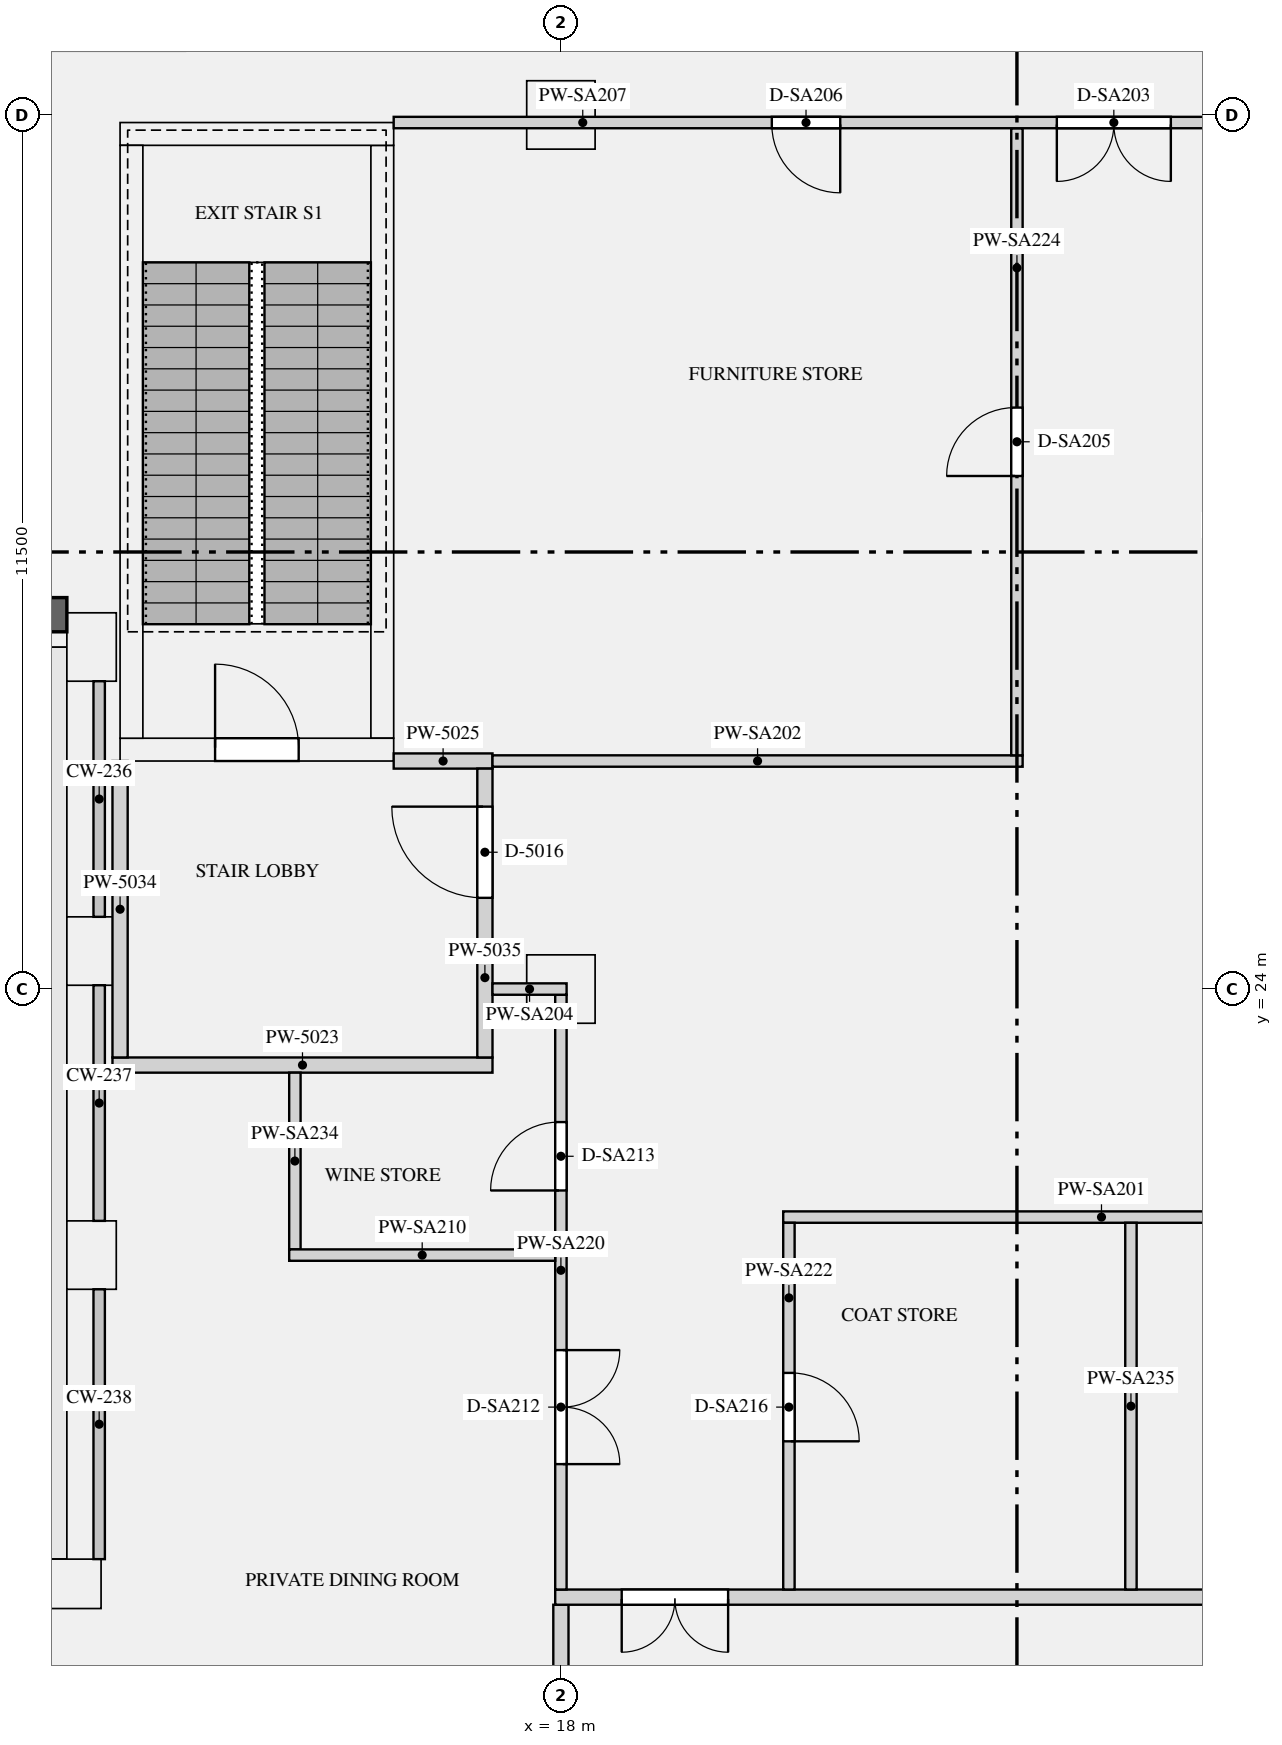
"""IFC4 building model, lengths in metres.
Left out: names, types, materials, properties, quantities, classifications, styles, units other than length and angle.
Written with IfcOpenShell. Run it as: python <this file> out.ifc"""

import sys

from ifc_helpers import new_model, si_unit, direction, frame, frame_2d, origin, origin_2d, place, context, subcontext, project, spatial, rectangle, extrude, element, fill, save


model = new_model("IFC4")
c1 = context("Model", 3, precision=1e-05, world=origin(), true_north=direction((0.0, 1.0)))
c2 = subcontext(c1, "Body", "Model", "MODEL_VIEW")
j1 = project(units=[si_unit("LENGTHUNIT", "METRE"), si_unit("PLANEANGLEUNIT", "RADIAN")], contexts=[c1])
p1 = place(None, origin())
s1 = spatial("IfcSite", under=j1, at=p1, CompositionType="ELEMENT")
p2 = place(p1, origin())
s2 = spatial("IfcBuilding", under=s1, at=p2, CompositionType="ELEMENT")
p3 = place(p2, frame((0.0, 0.0, 191.7)))
s3 = spatial("IfcBuildingStorey", under=s2, at=p3, CompositionType="ELEMENT", Elevation=191.7)
for number, where, z_axis, x_axis in (
    (1, (11.825, 28.5, 0.0), (0.0, 0.0, 1.0), (0.0, -1.0, 0.0)),
    (2, (11.825, 24.5, 0.0), (0.0, 0.0, 1.0), (0.0, -1.0, 0.0)),
    (3, (11.825, 20.5, 0.0), (0.0, 0.0, 1.0), (0.0, -1.0, 0.0)),
    (4, (11.5, 16.175, 0.0), (0.0, 0.0, 1.0), (-1.0, 0.0, 0.0)),
):
    element("IfcColumn", number, at=place(p3, frame(where, z_axis=z_axis, x_axis=x_axis)), inside=s3, PredefinedType="USERDEFINED", context=c2, shape_type="SweptSolid", body=[
        extrude(rectangle(XDim=0.9, YDim=0.65, at=origin_2d()), origin(), (0.0, 0.0, 1.0), 6.3),
    ])
for number, where, z_axis, x_axis in (
    (5, (18.0, 24.0, 0.0), (0.0, 0.0, 1.0), (1.0, 0.0, 0.0)),
    (6, (18.0, 35.5, 0.0), (0.0, 0.0, 1.0), (1.0, 0.0, 0.0)),
):
    element("IfcColumn", number, at=place(p3, frame(where, z_axis=z_axis, x_axis=x_axis)), inside=s3, PredefinedType="COLUMN", context=c2, shape_type="SweptSolid", body=[
        extrude(rectangle(XDim=0.9, YDim=0.9, at=origin_2d()), origin(), (0.0, 0.0, 1.0), 6.3),
    ])
p4 = place(p3, frame((12.2, 27.15, 0.0), z_axis=(0.0, 0.0, 1.0), x_axis=(1.0, 0.0, 0.0)))
e7 = element("IfcWall", 7, at=p4, inside=s3, PredefinedType="SHEAR", context=c2, shape_type="SweptSolid", body=[
    extrude(rectangle(XDim=3.6, YDim=0.3, at=frame_2d((1.8, 0.0))), origin(), (0.0, 0.0, 1.0), 6.3),
])
p5 = place(p4, frame((1.25, 0.0, 0.0)))
e8 = element("IfcOpeningElement", 8, at=p5, cuts=e7, PredefinedType="OPENING", context=c2, shape_type="SweptSolid", body=[
    extrude(rectangle(XDim=1.1, YDim=2.1, at=frame_2d((0.55, 1.05))), frame((0.0, 0.16, 0.0), z_axis=(0.0, -1.0, 0.0), x_axis=(1.0, 0.0, 0.0)), (0.0, 0.0, 1.0), 0.32),
])
p6 = place(p3, frame((12.2, 35.25, 0.0), z_axis=(0.0, 0.0, 1.0), x_axis=(1.0, 0.0, 0.0)))
e9 = element("IfcWall", 9, at=p6, inside=s3, PredefinedType="SHEAR", context=c2, shape_type="SweptSolid", body=[
    extrude(rectangle(XDim=3.6, YDim=0.3, at=frame_2d((1.8, 0.0))), origin(), (0.0, 0.0, 1.0), 6.3),
])
for number, where, z_axis, x_axis in (
    (10, (12.35, 27.3, 0.0), (0.0, 0.0, 1.0), (0.0, 1.0, 0.0)),
    (11, (15.65, 27.3, 0.0), (0.0, 0.0, 1.0), (0.0, 1.0, 0.0)),
):
    element("IfcWall", number, at=place(p3, frame(where, z_axis=z_axis, x_axis=x_axis)), inside=s3, PredefinedType="SHEAR", context=c2, shape_type="SweptSolid", body=[
        extrude(rectangle(XDim=7.8, YDim=0.3, at=frame_2d((3.9, 0.0))), origin(), (0.0, 0.0, 1.0), 6.3),
    ])
p7 = place(p3, frame((9.9, 28.925, 0.9), z_axis=(0.0, 0.0, 1.0), x_axis=(1.0, 0.0, 0.0)))
e12 = element("IfcWall", 12, at=p7, inside=s3, PredefinedType="SOLIDWALL", context=c2, shape_type="SweptSolid", body=[
    extrude(rectangle(XDim=1.6, YDim=0.45, at=frame_2d((0.8, 0.0))), origin(), (0.0, 0.0, 1.0), 5.08),
])
p8 = place(p3, frame((12.1, 23.0, 0.0), z_axis=(0.0, 0.0, 1.0), x_axis=(1.0, 0.0, 0.0)))
e13 = element("IfcWall", 13, at=p8, inside=s3, PredefinedType="PARTITIONING", context=c2, shape_type="SweptSolid", body=[
    extrude(rectangle(XDim=5.0, YDim=0.2, at=frame_2d((2.5, 0.0))), origin(), (0.0, 0.0, 1.0), 5.98),
])
p9 = place(p3, frame((15.8, 27.0, 0.0), z_axis=(0.0, 0.0, 1.0), x_axis=(1.0, 0.0, 0.0)))
e14 = element("IfcWall", 14, at=p9, inside=s3, PredefinedType="PARTITIONING", context=c2, shape_type="SweptSolid", body=[
    extrude(rectangle(XDim=1.3, YDim=0.2, at=frame_2d((0.65, 0.0))), origin(), (0.0, 0.0, 1.0), 5.98),
])
p10 = place(p3, frame((18.0, 12.5, 0.0), z_axis=(0.0, 0.0, 1.0), x_axis=(0.0, 1.0, 0.0)))
e15 = element("IfcWall", 15, at=p10, inside=s3, PredefinedType="PARTITIONING", context=c2, shape_type="SweptSolid", body=[
    extrude(rectangle(XDim=3.4, YDim=0.2, at=frame_2d((1.7, 0.0))), origin(), (0.0, 0.0, 1.0), 5.98),
])
p11 = place(p3, frame((12.2, 23.1, 0.0), z_axis=(0.0, 0.0, 1.0), x_axis=(0.0, 1.0, 0.0)))
e16 = element("IfcWall", 16, at=p11, inside=s3, PredefinedType="PARTITIONING", context=c2, shape_type="SweptSolid", body=[
    extrude(rectangle(XDim=3.9, YDim=0.2, at=frame_2d((1.95, 0.0))), origin(), (0.0, 0.0, 1.0), 5.98),
])
p12 = place(p3, frame((17.0, 23.1, 0.0), z_axis=(0.0, 0.0, 1.0), x_axis=(0.0, 1.0, 0.0)))
e17 = element("IfcWall", 17, at=p12, inside=s3, PredefinedType="PARTITIONING", context=c2, shape_type="SweptSolid", body=[
    extrude(rectangle(XDim=3.8, YDim=0.2, at=frame_2d((1.9, 0.0))), origin(), (0.0, 0.0, 1.0), 5.98),
])
p13 = place(p12, frame((2.1, 0.0, 0.0)))
e18 = element("IfcOpeningElement", 18, at=p13, cuts=e17, PredefinedType="OPENING", context=c2, shape_type="SweptSolid", body=[
    extrude(rectangle(XDim=1.2, YDim=2.1, at=frame_2d((0.6, 1.05))), frame((0.0, 0.11, 0.0), z_axis=(0.0, -1.0, 0.0), x_axis=(1.0, 0.0, 0.0)), (0.0, 0.0, 1.0), 0.22),
])
p14 = place(p3, frame((20.925, 21.0, 0.0), z_axis=(0.0, 0.0, 1.0), x_axis=(1.0, 0.0, 0.0)))
e19 = element("IfcWall", 19, at=p14, inside=s3, PredefinedType="PARTITIONING", context=c2, shape_type="SweptSolid", body=[
    extrude(rectangle(XDim=30.15, YDim=0.15, at=frame_2d((15.075, 0.0))), origin(), (0.0, 0.0, 1.0), 5.98),
])
p15 = place(p14, frame((8.375, 0.0, 0.0)))
e20 = element("IfcOpeningElement", 20, at=p15, cuts=e19, PredefinedType="OPENING", context=c2, shape_type="SweptSolid", body=[
    extrude(rectangle(XDim=0.9, YDim=2.1, at=frame_2d((0.45, 1.05))), frame((0.0, 0.085, 0.0), z_axis=(0.0, -1.0, 0.0), x_axis=(1.0, 0.0, 0.0)), (0.0, 0.0, 1.0), 0.17),
])
p16 = place(p14, frame((14.625, 0.0, 0.0)))
e21 = element("IfcOpeningElement", 21, at=p16, cuts=e19, PredefinedType="OPENING", context=c2, shape_type="SweptSolid", body=[
    extrude(rectangle(XDim=0.9, YDim=2.1, at=frame_2d((0.45, 1.05))), frame((0.0, 0.085, 0.0), z_axis=(0.0, -1.0, 0.0), x_axis=(1.0, 0.0, 0.0)), (0.0, 0.0, 1.0), 0.17),
])
p17 = place(p14, frame((19.375, 0.0, 0.0)))
e22 = element("IfcOpeningElement", 22, at=p17, cuts=e19, PredefinedType="OPENING", context=c2, shape_type="SweptSolid", body=[
    extrude(rectangle(XDim=0.9, YDim=2.1, at=frame_2d((0.45, 1.05))), frame((0.0, 0.085, 0.0), z_axis=(0.0, -1.0, 0.0), x_axis=(1.0, 0.0, 0.0)), (0.0, 0.0, 1.0), 0.17),
])
p18 = place(p14, frame((25.875, 0.0, 0.0)))
e23 = element("IfcOpeningElement", 23, at=p18, cuts=e19, PredefinedType="OPENING", context=c2, shape_type="SweptSolid", body=[
    extrude(rectangle(XDim=0.9, YDim=2.1, at=frame_2d((0.45, 1.05))), frame((0.0, 0.085, 0.0), z_axis=(0.0, -1.0, 0.0), x_axis=(1.0, 0.0, 0.0)), (0.0, 0.0, 1.0), 0.17),
])
p19 = place(p3, frame((17.1, 27.0, 0.0), z_axis=(0.0, 0.0, 1.0), x_axis=(1.0, 0.0, 0.0)))
e24 = element("IfcWall", 24, at=p19, inside=s3, PredefinedType="PARTITIONING", context=c2, shape_type="SweptSolid", body=[
    extrude(rectangle(XDim=6.975, YDim=0.15, at=frame_2d((3.487, 0.0))), origin(), (0.0, 0.0, 1.0), 5.98),
])
p20 = place(p3, frame((17.1, 24.0, 0.0), z_axis=(0.0, 0.0, 1.0), x_axis=(1.0, 0.0, 0.0)))
e25 = element("IfcWall", 25, at=p20, inside=s3, PredefinedType="PARTITIONING", context=c2, shape_type="SweptSolid", body=[
    extrude(rectangle(XDim=0.975, YDim=0.15, at=frame_2d((0.487, 0.0))), origin(), (0.0, 0.0, 1.0), 5.98),
])
p21 = place(p3, frame((15.8, 35.4, 0.0), z_axis=(0.0, 0.0, 1.0), x_axis=(1.0, 0.0, 0.0)))
e26 = element("IfcWall", 26, at=p21, inside=s3, PredefinedType="PARTITIONING", context=c2, shape_type="SweptSolid", body=[
    extrude(rectangle(XDim=11.2, YDim=0.15, at=frame_2d((5.6, 0.0))), origin(), (0.0, 0.0, 1.0), 5.98),
])
p22 = place(p21, frame((8.725, 0.0, 0.0)))
e27 = element("IfcOpeningElement", 27, at=p22, cuts=e26, PredefinedType="OPENING", context=c2, shape_type="SweptSolid", body=[
    extrude(rectangle(XDim=1.5, YDim=2.1, at=frame_2d((0.75, 1.05))), frame((0.0, 0.085, 0.0), z_axis=(0.0, -1.0, 0.0), x_axis=(1.0, 0.0, 0.0)), (0.0, 0.0, 1.0), 0.17),
])
p23 = place(p21, frame((4.975, 0.0, 0.0)))
e28 = element("IfcOpeningElement", 28, at=p23, cuts=e26, PredefinedType="OPENING", context=c2, shape_type="SweptSolid", body=[
    extrude(rectangle(XDim=0.9, YDim=2.1, at=frame_2d((0.45, 1.05))), frame((0.0, 0.085, 0.0), z_axis=(0.0, -1.0, 0.0), x_axis=(1.0, 0.0, 0.0)), (0.0, 0.0, 1.0), 0.17),
])
p24 = place(p3, frame((14.425, 20.5, 0.0), z_axis=(0.0, 0.0, 1.0), x_axis=(1.0, 0.0, 0.0)))
e29 = element("IfcWall", 29, at=p24, inside=s3, PredefinedType="PARTITIONING", context=c2, shape_type="SweptSolid", body=[
    extrude(rectangle(XDim=3.5, YDim=0.15, at=frame_2d((1.75, 0.0))), origin(), (0.0, 0.0, 1.0), 5.98),
])
p25 = place(p3, frame((17.925, 16.0, 0.0), z_axis=(0.0, 0.0, 1.0), x_axis=(1.0, 0.0, 0.0)))
e30 = element("IfcWall", 30, at=p25, inside=s3, PredefinedType="PARTITIONING", context=c2, shape_type="SweptSolid", body=[
    extrude(rectangle(XDim=36.15, YDim=0.2, at=frame_2d((18.075, 0.0))), origin(), (0.0, 0.0, 1.0), 5.98),
])
p26 = place(p25, frame((0.875, 0.0, 0.0)))
e31 = element("IfcOpeningElement", 31, at=p26, cuts=e30, PredefinedType="OPENING", context=c2, shape_type="SweptSolid", body=[
    extrude(rectangle(XDim=1.4, YDim=2.1, at=frame_2d((0.7, 1.05))), frame((0.0, 0.11, 0.0), z_axis=(0.0, -1.0, 0.0), x_axis=(1.0, 0.0, 0.0)), (0.0, 0.0, 1.0), 0.22),
])
p27 = place(p25, frame((33.875, 0.0, 0.0)))
e32 = element("IfcOpeningElement", 32, at=p27, cuts=e30, PredefinedType="OPENING", context=c2, shape_type="SweptSolid", body=[
    extrude(rectangle(XDim=1.4, YDim=2.1, at=frame_2d((0.7, 1.05))), frame((0.0, 0.11, 0.0), z_axis=(0.0, -1.0, 0.0), x_axis=(1.0, 0.0, 0.0)), (0.0, 0.0, 1.0), 0.22),
])
p28 = place(p3, frame((18.0, 16.1, 0.0), z_axis=(0.0, 0.0, 1.0), x_axis=(0.0, 1.0, 0.0)))
e33 = element("IfcWall", 33, at=p28, inside=s3, PredefinedType="PARTITIONING", context=c2, shape_type="SweptSolid", body=[
    extrude(rectangle(XDim=7.825, YDim=0.15, at=frame_2d((3.913, 0.0))), origin(), (0.0, 0.0, 1.0), 5.98),
])
p29 = place(p28, frame((1.65, 0.0, 0.0)))
e34 = element("IfcOpeningElement", 34, at=p29, cuts=e33, PredefinedType="OPENING", context=c2, shape_type="SweptSolid", body=[
    extrude(rectangle(XDim=1.5, YDim=2.1, at=frame_2d((0.75, 1.05))), frame((0.0, 0.085, 0.0), z_axis=(0.0, -1.0, 0.0), x_axis=(1.0, 0.0, 0.0)), (0.0, 0.0, 1.0), 0.17),
])
p30 = place(p28, frame((5.25, 0.0, 0.0)))
e35 = element("IfcOpeningElement", 35, at=p30, cuts=e33, PredefinedType="OPENING", context=c2, shape_type="SweptSolid", body=[
    extrude(rectangle(XDim=0.9, YDim=2.1, at=frame_2d((0.45, 1.05))), frame((0.0, 0.085, 0.0), z_axis=(0.0, -1.0, 0.0), x_axis=(1.0, 0.0, 0.0)), (0.0, 0.0, 1.0), 0.17),
])
p31 = place(p3, frame((21.0, 16.1, 0.0), z_axis=(0.0, 0.0, 1.0), x_axis=(0.0, 1.0, 0.0)))
e36 = element("IfcWall", 36, at=p31, inside=s3, PredefinedType="PARTITIONING", context=c2, shape_type="SweptSolid", body=[
    extrude(rectangle(XDim=4.825, YDim=0.15, at=frame_2d((2.413, 0.0))), origin(), (0.0, 0.0, 1.0), 5.98),
])
p32 = place(p31, frame((1.95, 0.0, 0.0)))
e37 = element("IfcOpeningElement", 37, at=p32, cuts=e36, PredefinedType="OPENING", context=c2, shape_type="SweptSolid", body=[
    extrude(rectangle(XDim=0.9, YDim=2.1, at=frame_2d((0.45, 1.05))), frame((0.0, 0.085, 0.0), z_axis=(0.0, -1.0, 0.0), x_axis=(1.0, 0.0, 0.0)), (0.0, 0.0, 1.0), 0.17),
])
p33 = place(p3, frame((24.0, 27.075, 0.0), z_axis=(0.0, 0.0, 1.0), x_axis=(0.0, 1.0, 0.0)))
e38 = element("IfcWall", 38, at=p33, inside=s3, PredefinedType="PARTITIONING", context=c2, shape_type="SweptSolid", body=[
    extrude(rectangle(XDim=8.25, YDim=0.15, at=frame_2d((4.125, 0.0))), origin(), (0.0, 0.0, 1.0), 5.98),
])
p34 = place(p33, frame((3.675, 0.0, 0.0)))
e39 = element("IfcOpeningElement", 39, at=p34, cuts=e38, PredefinedType="OPENING", context=c2, shape_type="SweptSolid", body=[
    extrude(rectangle(XDim=0.9, YDim=2.1, at=frame_2d((0.45, 1.05))), frame((0.0, 0.085, 0.0), z_axis=(0.0, -1.0, 0.0), x_axis=(1.0, 0.0, 0.0)), (0.0, 0.0, 1.0), 0.17),
])
p35 = place(p3, frame((14.5, 20.575, 0.0), z_axis=(0.0, 0.0, 1.0), x_axis=(0.0, 1.0, 0.0)))
e40 = element("IfcWall", 40, at=p35, inside=s3, PredefinedType="PARTITIONING", context=c2, shape_type="SweptSolid", body=[
    extrude(rectangle(XDim=2.325, YDim=0.15, at=frame_2d((1.163, 0.0))), origin(), (0.0, 0.0, 1.0), 5.98),
])
p36 = place(p3, frame((25.5, 16.1, 0.0), z_axis=(0.0, 0.0, 1.0), x_axis=(0.0, 1.0, 0.0)))
e41 = element("IfcWall", 41, at=p36, inside=s3, PredefinedType="PARTITIONING", context=c2, shape_type="SweptSolid", body=[
    extrude(rectangle(XDim=4.825, YDim=0.15, at=frame_2d((2.413, 0.0))), origin(), (0.0, 0.0, 1.0), 5.98),
])
p37 = place(p5, origin())
e42 = element("IfcDoor", 42, at=p37, inside=s3, OperationType="SINGLE_SWING_LEFT", PredefinedType="DOOR", context=c2, shape_type="SweptSolid", body=[
    extrude(rectangle(XDim=1.1, YDim=2.1, at=frame_2d((0.55, 1.05))), frame((0.0, 0.025, 0.0), z_axis=(0.0, -1.0, 0.0), x_axis=(1.0, 0.0, 0.0)), (0.0, 0.0, 1.0), 0.05),
])
fill(e8, e42)
p38 = place(p13, origin())
e43 = element("IfcDoor", 43, at=p38, inside=s3, OperationType="SINGLE_SWING_RIGHT", PredefinedType="DOOR", context=c2, shape_type="SweptSolid", body=[
    extrude(rectangle(XDim=1.2, YDim=2.1, at=frame_2d((0.6, 1.05))), frame((0.0, 0.025, 0.0), z_axis=(0.0, -1.0, 0.0), x_axis=(1.0, 0.0, 0.0)), (0.0, 0.0, 1.0), 0.05),
])
fill(e18, e43)
p39 = place(p26, frame((1.4, 0.0, 0.0), z_axis=(0.0, 0.0, 1.0), x_axis=(-1.0, 0.0, 0.0)))
e44 = element("IfcDoor", 44, at=p39, inside=s3, OperationType="DOUBLE_DOOR_SINGLE_SWING", PredefinedType="DOOR", context=c2, shape_type="SweptSolid", body=[
    extrude(rectangle(XDim=1.4, YDim=2.1, at=frame_2d((0.7, 1.05))), frame((0.0, 0.025, 0.0), z_axis=(0.0, -1.0, 0.0), x_axis=(1.0, 0.0, 0.0)), (0.0, 0.0, 1.0), 0.05),
])
fill(e31, e44)
p40 = place(p22, frame((1.5, 0.0, 0.0), z_axis=(0.0, 0.0, 1.0), x_axis=(-1.0, 0.0, 0.0)))
e45 = element("IfcDoor", 45, at=p40, inside=s3, OperationType="DOUBLE_DOOR_SINGLE_SWING", PredefinedType="DOOR", context=c2, shape_type="SweptSolid", body=[
    extrude(rectangle(XDim=1.5, YDim=2.1, at=frame_2d((0.75, 1.05))), frame((0.0, 0.025, 0.0), z_axis=(0.0, -1.0, 0.0), x_axis=(1.0, 0.0, 0.0)), (0.0, 0.0, 1.0), 0.05),
])
fill(e27, e45)
p41 = place(p34, origin())
e46 = element("IfcDoor", 46, at=p41, inside=s3, OperationType="SINGLE_SWING_LEFT", PredefinedType="DOOR", context=c2, shape_type="SweptSolid", body=[
    extrude(rectangle(XDim=0.9, YDim=2.1, at=frame_2d((0.45, 1.05))), frame((0.0, 0.025, 0.0), z_axis=(0.0, -1.0, 0.0), x_axis=(1.0, 0.0, 0.0)), (0.0, 0.0, 1.0), 0.05),
])
fill(e39, e46)
p42 = place(p23, frame((0.9, 0.0, 0.0), z_axis=(0.0, 0.0, 1.0), x_axis=(-1.0, 0.0, 0.0)))
e47 = element("IfcDoor", 47, at=p42, inside=s3, OperationType="SINGLE_SWING_LEFT", PredefinedType="DOOR", context=c2, shape_type="SweptSolid", body=[
    extrude(rectangle(XDim=0.9, YDim=2.1, at=frame_2d((0.45, 1.05))), frame((0.0, 0.025, 0.0), z_axis=(0.0, -1.0, 0.0), x_axis=(1.0, 0.0, 0.0)), (0.0, 0.0, 1.0), 0.05),
])
fill(e28, e47)
p43 = place(p29, frame((1.5, 0.0, 0.0), z_axis=(0.0, 0.0, 1.0), x_axis=(-1.0, 0.0, 0.0)))
e48 = element("IfcDoor", 48, at=p43, inside=s3, OperationType="DOUBLE_DOOR_SINGLE_SWING", PredefinedType="DOOR", context=c2, shape_type="SweptSolid", body=[
    extrude(rectangle(XDim=1.5, YDim=2.1, at=frame_2d((0.75, 1.05))), frame((0.0, 0.025, 0.0), z_axis=(0.0, -1.0, 0.0), x_axis=(1.0, 0.0, 0.0)), (0.0, 0.0, 1.0), 0.05),
])
fill(e34, e48)
p44 = place(p30, origin())
e49 = element("IfcDoor", 49, at=p44, inside=s3, OperationType="SINGLE_SWING_LEFT", PredefinedType="DOOR", context=c2, shape_type="SweptSolid", body=[
    extrude(rectangle(XDim=0.9, YDim=2.1, at=frame_2d((0.45, 1.05))), frame((0.0, 0.025, 0.0), z_axis=(0.0, -1.0, 0.0), x_axis=(1.0, 0.0, 0.0)), (0.0, 0.0, 1.0), 0.05),
])
fill(e35, e49)
p45 = place(p32, frame((0.9, 0.0, 0.0), z_axis=(0.0, 0.0, 1.0), x_axis=(-1.0, 0.0, 0.0)))
e50 = element("IfcDoor", 50, at=p45, inside=s3, OperationType="SINGLE_SWING_RIGHT", PredefinedType="DOOR", context=c2, shape_type="SweptSolid", body=[
    extrude(rectangle(XDim=0.9, YDim=2.1, at=frame_2d((0.45, 1.05))), frame((0.0, 0.025, 0.0), z_axis=(0.0, -1.0, 0.0), x_axis=(1.0, 0.0, 0.0)), (0.0, 0.0, 1.0), 0.05),
])
fill(e37, e50)
save(model, sys.argv[1])
